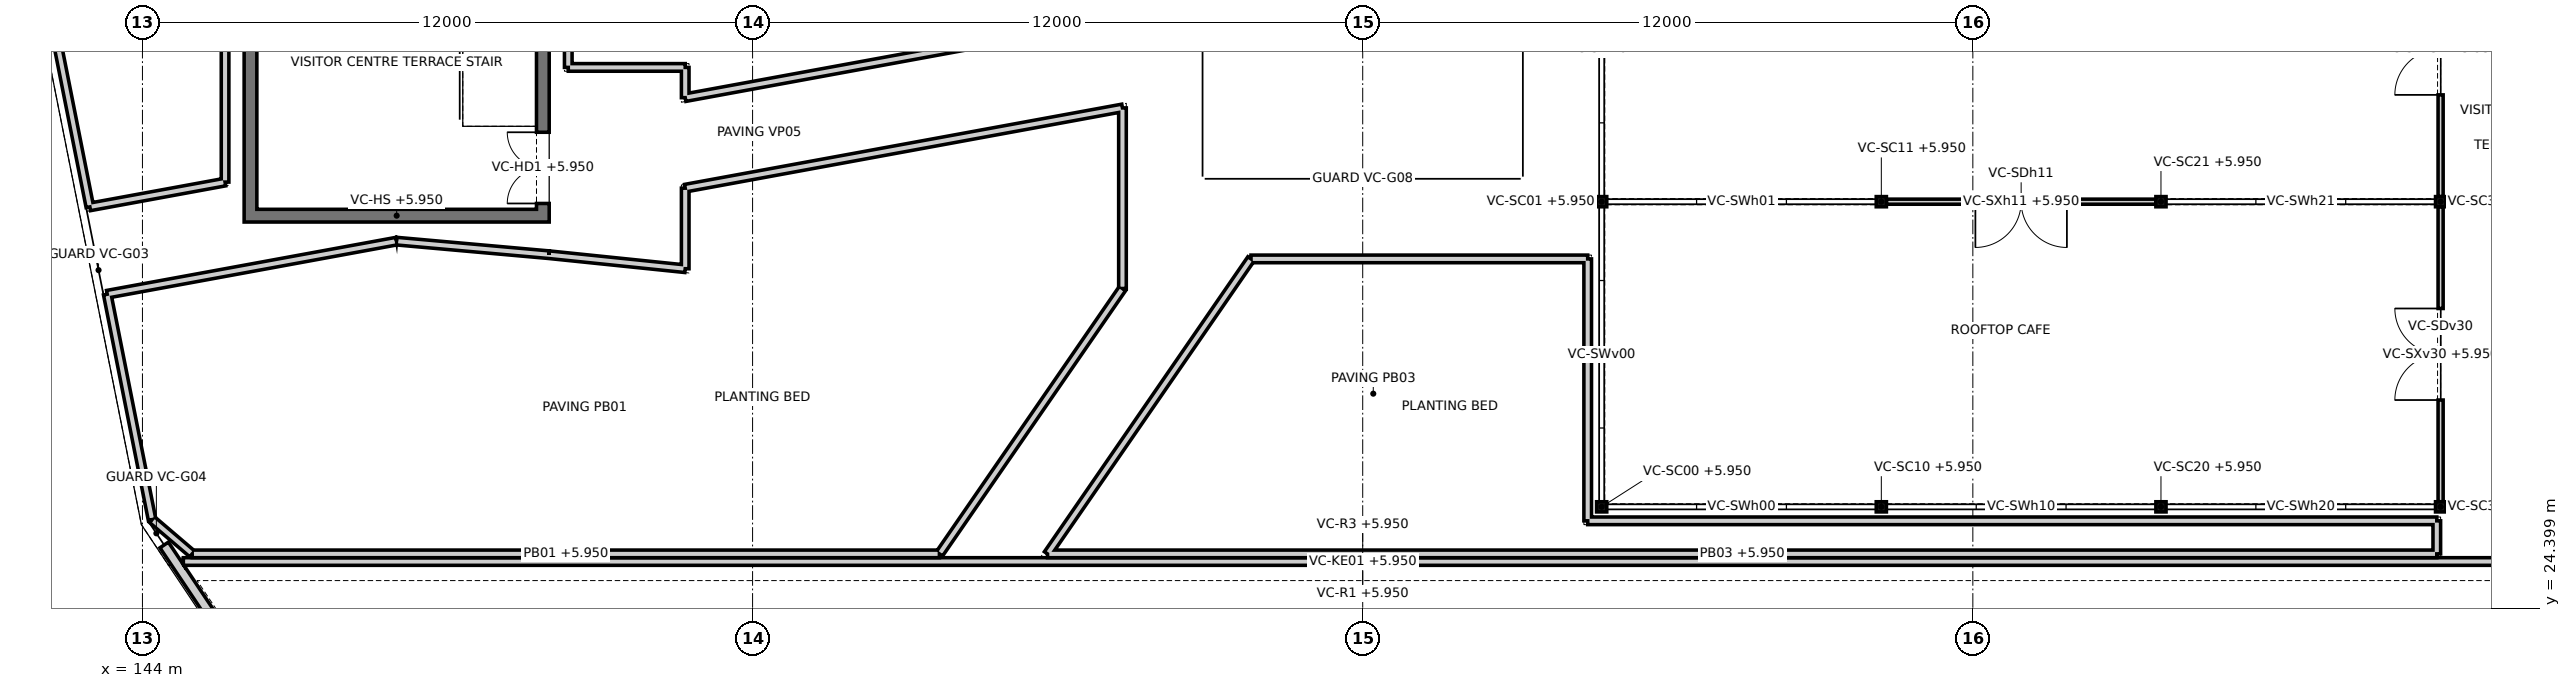
"""IFC4 building model, lengths in metres.
Left out: names, types, materials, properties, quantities, classifications, styles, units other than length and angle.
Written with IfcOpenShell. Run it as: python <this file> out.ifc"""

import sys

from ifc_helpers import new_model, si_unit, direction, frame, frame_2d, origin, origin_2d, place, context, subcontext, project, spatial, polyline, rectangle, hollow_rectangle, outline, extrude, element, fill, save


model = new_model("IFC4")
c1 = context("Model", 3, precision=1e-05, world=origin(), true_north=direction((0.0, 1.0)))
c2 = subcontext(c1, "Body", "Model", "MODEL_VIEW")
j1 = project(units=[si_unit("LENGTHUNIT", "METRE"), si_unit("PLANEANGLEUNIT", "RADIAN")], contexts=[c1])
p1 = place(None, origin())
s1 = spatial("IfcSite", under=j1, at=p1, CompositionType="ELEMENT")
p2 = place(p1, origin())
s2 = spatial("IfcBuilding", under=s1, at=p2, CompositionType="ELEMENT")
p3 = place(p2, frame((0.0, 0.0, 6.0)))
s3 = spatial("IfcBuildingStorey", under=s2, at=p3, CompositionType="ELEMENT", Elevation=6.0)
p4 = place(p3, frame((148.996, 31.625, -0.05), z_axis=(0.0, 0.0, 1.0), x_axis=(-0.983582964216, -0.180456511395, 0.0)))
e1 = element("IfcWall", 1, at=p4, inside=s3, PredefinedType="PARAPET", context=c2, shape_type="SweptSolid", body=[
    extrude(outline(polyline([(-0.01, -0.075), (5.86, -0.075), (5.708, 0.075), (0.01, 0.075), (-0.01, -0.075)])), origin(), (0.0, 0.0, 1.0), 0.5),
])
p5 = place(p3, frame((143.307, 30.581, -0.05), z_axis=(0.0, 0.0, 1.0), x_axis=(0.195097795379, -0.980783793829, 0.0)))
e2 = element("IfcWall", 2, at=p5, inside=s3, PredefinedType="PARAPET", context=c2, shape_type="SweptSolid", body=[
    extrude(outline(polyline([(-0.076, -0.075), (4.545, -0.075), (4.493, 0.075), (0.076, 0.075), (-0.076, -0.075)])), origin(), (0.0, 0.0, 1.0), 0.5),
])
p6 = place(p3, frame((144.189, 26.149, -0.05), z_axis=(0.0, 0.0, 1.0), x_axis=(0.760451137775, -0.649395154783, 0.0)))
e3 = element("IfcWall", 3, at=p6, inside=s3, PredefinedType="PARAPET", context=c2, shape_type="SweptSolid", body=[
    extrude(outline(polyline([(-0.026, -0.075), (1.065, -0.075), (1.01, 0.075), (0.026, 0.075), (-0.026, -0.075)])), origin(), (0.0, 0.0, 1.0), 0.5),
])
p7 = place(p3, frame((144.978, 25.475, -0.05), z_axis=(0.0, 0.0, 1.0), x_axis=(1.0, 0.0, 0.0)))
e4 = element("IfcWall", 4, at=p7, inside=s3, PredefinedType="PARAPET", context=c2, shape_type="SweptSolid", body=[
    extrude(outline(polyline([(-0.028, -0.075), (14.736, -0.075), (14.657, 0.075), (0.028, 0.075), (-0.028, -0.075)])), origin(), (0.0, 0.0, 1.0), 0.5),
])
p8 = place(p3, frame((159.675, 25.475, -0.05), z_axis=(0.0, 0.0, 1.0), x_axis=(0.567907537853, 0.823092357181, 0.0)))
e5 = element("IfcWall", 5, at=p8, inside=s3, PredefinedType="PARAPET", context=c2, shape_type="SweptSolid", body=[
    extrude(outline(polyline([(-0.039, -0.075), (6.363, -0.075), (6.316, 0.075), (0.039, 0.075), (-0.039, -0.075)])), origin(), (0.0, 0.0, 1.0), 0.5),
])
p9 = place(p3, frame((163.275, 30.693, -0.05), z_axis=(0.0, 0.0, 1.0), x_axis=(0.0, 1.0, 0.0)))
e6 = element("IfcWall", 6, at=p9, inside=s3, PredefinedType="PARAPET", context=c2, shape_type="SweptSolid", body=[
    extrude(outline(polyline([(-0.023, -0.075), (3.641, -0.075), (3.461, 0.075), (0.023, 0.075), (-0.023, -0.075)])), origin(), (0.0, 0.0, 1.0), 0.5),
])
p10 = place(p3, frame((163.275, 34.244, -0.05), z_axis=(0.0, 0.0, 1.0), x_axis=(-0.983586327493, -0.180438178801, 0.0)))
e7 = element("IfcWall", 7, at=p10, inside=s3, PredefinedType="PARAPET", context=c2, shape_type="SweptSolid", body=[
    extrude(outline(polyline([(-0.09, -0.075), (8.806, -0.075), (8.681, 0.075), (0.09, 0.075), (-0.09, -0.075)])), origin(), (0.0, 0.0, 1.0), 0.5),
])
p11 = place(p3, frame((154.675, 32.666, -0.05), z_axis=(0.0, 0.0, 1.0), x_axis=(0.0, -1.0, 0.0)))
e8 = element("IfcWall", 8, at=p11, inside=s3, PredefinedType="PARAPET", context=c2, shape_type="SweptSolid", body=[
    extrude(outline(polyline([(-0.062, -0.075), (1.501, -0.075), (1.667, 0.075), (0.062, 0.075), (-0.062, -0.075)])), origin(), (0.0, 0.0, 1.0), 0.5),
])
p12 = place(p3, frame((154.675, 31.082, -0.05), z_axis=(0.0, 0.0, 1.0), x_axis=(-0.994742485046, 0.102407951082, 0.0)))
e9 = element("IfcWall", 9, at=p12, inside=s3, PredefinedType="PARAPET", context=c2, shape_type="SweptSolid", body=[
    extrude(outline(polyline([(0.083, -0.075), (2.697, -0.075), (2.696, 0.075), (-0.083, 0.075), (0.083, -0.075)])), origin(), (0.0, 0.0, 1.0), 0.5),
])
p13 = place(p3, frame((151.993, 31.358, -0.05), z_axis=(0.0, 0.0, 1.0), x_axis=(-0.996066276854, 0.088611354324, 0.0)))
e10 = element("IfcWall", 10, at=p13, inside=s3, PredefinedType="PARAPET", context=c2, shape_type="SweptSolid", body=[
    extrude(outline(polyline([(-0.0, -0.075), (3.019, -0.075), (2.998, 0.075), (0.0, 0.075), (-0.0, -0.075)])), origin(), (0.0, 0.0, 1.0), 0.5),
])
p14 = place(p3, frame((142.229, 35.999, -0.05), z_axis=(0.0, 0.0, 1.0), x_axis=(0.195095964935, -0.98078415794, 0.0)))
e11 = element("IfcWall", 11, at=p14, inside=s3, PredefinedType="PARAPET", context=c2, shape_type="SweptSolid", body=[
    extrude(outline(polyline([(-0.016, -0.075), (3.848, -0.075), (3.7, 0.075), (0.016, 0.075), (-0.016, -0.075)])), origin(), (0.0, 0.0, 1.0), 0.5),
])
p15 = place(p3, frame((142.966, 32.297, -0.05), z_axis=(0.0, 0.0, 1.0), x_axis=(0.983588399423, 0.180426884139, 0.0)))
e12 = element("IfcWall", 12, at=p15, inside=s3, PredefinedType="PARAPET", context=c2, shape_type="SweptSolid", body=[
    extrude(outline(polyline([(-0.074, -0.075), (2.766, -0.075), (2.641, 0.075), (0.074, 0.075), (-0.074, -0.075)])), origin(), (0.0, 0.0, 1.0), 0.5),
])
p16 = place(p3, frame((145.625, 32.785, -0.05), z_axis=(0.0, 0.0, 1.0), x_axis=(0.0, 1.0, 0.0)))
e13 = element("IfcWall", 13, at=p16, inside=s3, PredefinedType="PARAPET", context=c2, shape_type="SweptSolid", body=[
    extrude(outline(polyline([(-0.062, -0.075), (7.515, -0.075), (7.665, 0.075), (0.062, 0.075), (-0.062, -0.075)])), origin(), (0.0, 0.0, 1.0), 0.5),
])
p17 = place(p3, frame((152.375, 40.375, -0.05), z_axis=(0.0, 0.0, 1.0), x_axis=(0.0, -1.0, 0.0)))
e14 = element("IfcWall", 14, at=p17, inside=s3, PredefinedType="PARAPET", context=c2, shape_type="SweptSolid", body=[
    extrude(outline(polyline([(0.075, -0.075), (5.41, -0.075), (5.26, 0.075), (-0.075, 0.075), (0.075, -0.075)])), origin(), (0.0, 0.0, 1.0), 0.5),
])
p18 = place(p3, frame((152.375, 35.04, -0.05), z_axis=(0.0, 0.0, 1.0), x_axis=(1.0, 0.0, 0.0)))
e15 = element("IfcWall", 15, at=p18, inside=s3, PredefinedType="PARAPET", context=c2, shape_type="SweptSolid", body=[
    extrude(outline(polyline([(-0.075, -0.075), (2.225, -0.075), (2.375, 0.075), (0.075, 0.075), (-0.075, -0.075)])), origin(), (0.0, 0.0, 1.0), 0.5),
])
p19 = place(p3, frame((154.675, 35.04, -0.05), z_axis=(0.0, 0.0, 1.0), x_axis=(0.0, -1.0, 0.0)))
e16 = element("IfcWall", 16, at=p19, inside=s3, PredefinedType="PARAPET", context=c2, shape_type="SweptSolid", body=[
    extrude(outline(polyline([(0.075, -0.075), (0.685, -0.075), (0.505, 0.075), (-0.075, 0.075), (0.075, -0.075)])), origin(), (0.0, 0.0, 1.0), 0.5),
])
p20 = place(p3, frame((154.675, 34.445, -0.05), z_axis=(0.0, 0.0, 1.0), x_axis=(0.983586327493, 0.180438178801, 0.0)))
e17 = element("IfcWall", 17, at=p20, inside=s3, PredefinedType="PARAPET", context=c2, shape_type="SweptSolid", body=[
    extrude(outline(polyline([(-0.09, -0.075), (8.806, -0.075), (8.681, 0.075), (0.09, 0.075), (-0.09, -0.075)])), origin(), (0.0, 0.0, 1.0), 0.5),
])
p21 = place(p3, frame((161.801, 25.475, -0.05), z_axis=(0.0, 0.0, 1.0), x_axis=(1.0, 0.0, 0.0)))
e18 = element("IfcWall", 18, at=p21, inside=s3, PredefinedType="PARAPET", context=c2, shape_type="SweptSolid", body=[
    extrude(outline(polyline([(-0.143, -0.075), (27.399, -0.075), (27.249, 0.075), (0.143, 0.075), (-0.143, -0.075)])), origin(), (0.0, 0.0, 1.0), 0.5),
])
p22 = place(p3, frame((189.125, 25.475, -0.05), z_axis=(0.0, 0.0, 1.0), x_axis=(0.0, 1.0, 0.0)))
e19 = element("IfcWall", 19, at=p22, inside=s3, PredefinedType="PARAPET", context=c2, shape_type="SweptSolid", body=[
    extrude(outline(polyline([(-0.075, -0.075), (0.725, -0.075), (0.575, 0.075), (0.075, 0.075), (-0.075, -0.075)])), origin(), (0.0, 0.0, 1.0), 0.5),
])
p23 = place(p3, frame((189.125, 26.125, -0.05), z_axis=(0.0, 0.0, 1.0), x_axis=(-1.0, 0.0, 0.0)))
e20 = element("IfcWall", 20, at=p23, inside=s3, PredefinedType="PARAPET", context=c2, shape_type="SweptSolid", body=[
    extrude(outline(polyline([(-0.075, -0.075), (16.625, -0.075), (16.775, 0.075), (0.075, 0.075), (-0.075, -0.075)])), origin(), (0.0, 0.0, 1.0), 0.5),
])
p24 = place(p3, frame((172.425, 26.125, -0.05), z_axis=(0.0, 0.0, 1.0), x_axis=(0.0, 1.0, 0.0)))
e21 = element("IfcWall", 21, at=p24, inside=s3, PredefinedType="PARAPET", context=c2, shape_type="SweptSolid", body=[
    extrude(outline(polyline([(0.075, -0.075), (5.225, -0.075), (5.075, 0.075), (-0.075, 0.075), (0.075, -0.075)])), origin(), (0.0, 0.0, 1.0), 0.5),
])
p25 = place(p3, frame((172.425, 31.275, -0.05), z_axis=(0.0, 0.0, 1.0), x_axis=(-1.0, 0.0, 0.0)))
e22 = element("IfcWall", 22, at=p25, inside=s3, PredefinedType="PARAPET", context=c2, shape_type="SweptSolid", body=[
    extrude(outline(polyline([(-0.075, -0.075), (6.661, -0.075), (6.583, 0.075), (0.075, 0.075), (-0.075, -0.075)])), origin(), (0.0, 0.0, 1.0), 0.5),
])
p26 = place(p3, frame((165.803, 31.275, -0.05), z_axis=(0.0, 0.0, 1.0), x_axis=(-0.567933729625, -0.823074285076, 0.0)))
e23 = element("IfcWall", 23, at=p26, inside=s3, PredefinedType="PARAPET", context=c2, shape_type="SweptSolid", body=[
    extrude(outline(polyline([(-0.039, -0.075), (7.189, -0.075), (6.904, 0.075), (0.039, 0.075), (-0.039, -0.075)])), origin(), (0.0, 0.0, 1.0), 0.5),
])
p27 = place(p3, frame((144.804, 25.325, -0.05), z_axis=(0.0, 0.0, 1.0), x_axis=(1.0, 0.0, 0.0)))
e24 = element("IfcWall", 24, at=p27, inside=s3, PredefinedType="PARAPET", context=c2, shape_type="SweptSolid", body=[
    extrude(rectangle(XDim=46.391, YDim=0.15, at=frame_2d((23.196, 0.0))), origin(), (0.0, 0.0, 1.0), 0.5),
])
p28 = place(p3, frame((144.427, 25.65, -0.05), z_axis=(0.0, 0.0, 1.0), x_axis=(0.555574555908, -0.831466723825, 0.0)))
e25 = element("IfcWall", 25, at=p28, inside=s3, PredefinedType="PARAPET", context=c2, shape_type="SweptSolid", body=[
    extrude(outline(polyline([(0.0, -0.1), (9.553, -0.1), (9.513, 0.1), (0.0, 0.1), (0.0, -0.1)])), origin(), (0.0, 0.0, 1.0), 1.1),
])
p29 = place(p3, frame((186.277, 17.723, -0.05), z_axis=(0.0, 0.0, 1.0), x_axis=(0.555574555908, 0.831466723825, 0.0)))
e26 = element("IfcWall", 26, at=p29, inside=s3, PredefinedType="PARAPET", context=c2, shape_type="SweptSolid", body=[
    extrude(outline(polyline([(-0.02, -0.1), (9.533, -0.1), (9.533, 0.1), (0.02, 0.1), (-0.02, -0.1)])), origin(), (0.0, 0.0, 1.0), 1.1),
])
p30 = place(p3, frame((151.875, 32.0, -0.05), z_axis=(0.0, 0.0, 1.0), x_axis=(0.0, 1.0, 0.0)))
e27 = element("IfcWall", 27, at=p30, inside=s3, PredefinedType="SOLIDWALL", context=c2, shape_type="SweptSolid", body=[
    extrude(rectangle(XDim=8.0, YDim=0.25, at=frame_2d((4.0, 0.0))), origin(), (0.0, 0.0, 1.0), 3.0),
])
p31 = place(p30, frame((0.365, 0.0, 0.0)))
e28 = element("IfcOpeningElement", 28, at=p31, cuts=e27, PredefinedType="OPENING", context=c2, shape_type="SweptSolid", body=[
    extrude(rectangle(XDim=1.4, YDim=2.2, at=frame_2d((0.7, 1.1))), frame((0.0, 0.135, 0.0), z_axis=(0.0, -1.0, 0.0), x_axis=(1.0, 0.0, 0.0)), (0.0, 0.0, 1.0), 0.27),
])
p32 = place(p3, frame((146.125, 32.0, -0.05), z_axis=(0.0, 0.0, 1.0), x_axis=(0.0, 1.0, 0.0)))
e29 = element("IfcWall", 29, at=p32, inside=s3, PredefinedType="SOLIDWALL", context=c2, shape_type="SweptSolid", body=[
    extrude(rectangle(XDim=8.0, YDim=0.25, at=frame_2d((4.0, 0.0))), origin(), (0.0, 0.0, 1.0), 3.0),
])
p33 = place(p3, frame((146.25, 32.125, -0.05), z_axis=(0.0, 0.0, 1.0), x_axis=(1.0, 0.0, 0.0)))
e30 = element("IfcWall", 30, at=p33, inside=s3, PredefinedType="SOLIDWALL", context=c2, shape_type="SweptSolid", body=[
    extrude(rectangle(XDim=5.5, YDim=0.25, at=frame_2d((2.75, 0.0))), origin(), (0.0, 0.0, 1.0), 3.0),
])
for number, where, z_axis, x_axis in (
    (31, (172.7, 26.4, -0.05), (0.0, 0.0, 1.0), (1.0, 0.0, 0.0)),
    (32, (172.7, 32.4, -0.05), (0.0, 0.0, 1.0), (1.0, 0.0, 0.0)),
    (33, (178.2, 26.4, -0.05), (0.0, 0.0, 1.0), (1.0, 0.0, 0.0)),
    (34, (178.2, 32.4, -0.05), (0.0, 0.0, 1.0), (1.0, 0.0, 0.0)),
    (35, (183.7, 26.4, -0.05), (0.0, 0.0, 1.0), (1.0, 0.0, 0.0)),
    (36, (183.7, 32.4, -0.05), (0.0, 0.0, 1.0), (1.0, 0.0, 0.0)),
    (37, (189.2, 26.4, -0.05), (0.0, 0.0, 1.0), (1.0, 0.0, 0.0)),
    (38, (189.2, 32.4, -0.05), (0.0, 0.0, 1.0), (1.0, 0.0, 0.0)),
):
    element("IfcColumn", number, at=place(p3, frame(where, z_axis=z_axis, x_axis=x_axis)), inside=s3, PredefinedType="COLUMN", context=c2, shape_type="SweptSolid", body=[
        extrude(hollow_rectangle(XDim=0.2, YDim=0.2, WallThickness=0.01, at=origin_2d()), origin(), (0.0, 0.0, 1.0), 4.21),
    ])
p34 = place(p3, frame((178.3, 32.4, -0.05), z_axis=(0.0, 0.0, 1.0), x_axis=(1.0, 0.0, 0.0)))
e39 = element("IfcWall", 39, at=p34, inside=s3, PredefinedType="PARTITIONING", context=c2, shape_type="SweptSolid", body=[
    extrude(rectangle(XDim=5.3, YDim=0.1, at=frame_2d((2.65, 0.0))), origin(), (0.0, 0.0, 1.0), 4.21),
])
p35 = place(p34, frame((1.75, 0.0, 0.05)))
e40 = element("IfcOpeningElement", 40, at=p35, cuts=e39, PredefinedType="OPENING", context=c2, shape_type="SweptSolid", body=[
    extrude(rectangle(XDim=1.8, YDim=2.4, at=frame_2d((0.9, 1.2))), frame((0.0, 0.06, 0.0), z_axis=(0.0, -1.0, 0.0), x_axis=(1.0, 0.0, 0.0)), (0.0, 0.0, 1.0), 0.12),
])
p36 = place(p3, frame((189.2, 26.5, -0.05), z_axis=(0.0, 0.0, 1.0), x_axis=(0.0, 1.0, 0.0)))
e41 = element("IfcWall", 41, at=p36, inside=s3, PredefinedType="PARTITIONING", context=c2, shape_type="SweptSolid", body=[
    extrude(rectangle(XDim=5.8, YDim=0.1, at=frame_2d((2.9, 0.0))), origin(), (0.0, 0.0, 1.0), 4.21),
])
p37 = place(p36, frame((2.0, 0.0, 0.05)))
e42 = element("IfcOpeningElement", 42, at=p37, cuts=e41, PredefinedType="OPENING", context=c2, shape_type="SweptSolid", body=[
    extrude(rectangle(XDim=1.8, YDim=2.4, at=frame_2d((0.9, 1.2))), frame((0.0, 0.06, 0.0), z_axis=(0.0, -1.0, 0.0), x_axis=(1.0, 0.0, 0.0)), (0.0, 0.0, 1.0), 0.12),
])
p38 = place(p3, frame((189.2, 32.5, -0.05), z_axis=(0.0, 0.0, 1.0), x_axis=(0.0, 1.0, 0.0)))
e43 = element("IfcWall", 43, at=p38, inside=s3, PredefinedType="PARTITIONING", context=c2, shape_type="SweptSolid", body=[
    extrude(rectangle(XDim=5.8, YDim=0.1, at=frame_2d((2.9, 0.0))), origin(), (0.0, 0.0, 1.0), 4.21),
])
p39 = place(p38, frame((2.0, 0.0, 0.05)))
e44 = element("IfcOpeningElement", 44, at=p39, cuts=e43, PredefinedType="OPENING", context=c2, shape_type="SweptSolid", body=[
    extrude(rectangle(XDim=1.8, YDim=2.4, at=frame_2d((0.9, 1.2))), frame((0.0, 0.06, 0.0), z_axis=(0.0, -1.0, 0.0), x_axis=(1.0, 0.0, 0.0)), (0.0, 0.0, 1.0), 0.12),
])
p40 = place(p3, frame((0.0, 0.0, -0.451)))
p41 = place(p40, frame((168.0, 36.0, 0.0)))
p42 = place(p41, frame((0.0, 0.0, 0.351)))
e45 = element("IfcWindow", 45, at=p42, inside=s3, PartitioningType="SINGLE_PANEL", PredefinedType="SKYLIGHT", context=c2, shape_type="SweptSolid", body=[
    extrude(rectangle(XDim=5.6, YDim=5.6, at=origin_2d()), origin(), (0.0, 0.0, 1.0), 0.05),
])
p43 = place(p31, origin())
e46 = element("IfcDoor", 46, at=p43, inside=s3, OperationType="DOUBLE_DOOR_SINGLE_SWING", PredefinedType="DOOR", context=c2, shape_type="SweptSolid", body=[
    extrude(rectangle(XDim=1.4, YDim=2.2, at=frame_2d((0.7, 1.1))), frame((0.0, 0.025, 0.0), z_axis=(0.0, -1.0, 0.0), x_axis=(1.0, 0.0, 0.0)), (0.0, 0.0, 1.0), 0.05),
])
fill(e28, e46)
p44 = place(p35, frame((1.8, 0.0, 0.0), z_axis=(0.0, 0.0, 1.0), x_axis=(-1.0, 0.0, 0.0)))
e47 = element("IfcDoor", 47, at=p44, inside=s3, OperationType="DOUBLE_DOOR_SINGLE_SWING", PredefinedType="DOOR", context=c2, shape_type="SweptSolid", body=[
    extrude(rectangle(XDim=1.8, YDim=2.4, at=frame_2d((0.9, 1.2))), frame((0.0, 0.025, 0.0), z_axis=(0.0, -1.0, 0.0), x_axis=(1.0, 0.0, 0.0)), (0.0, 0.0, 1.0), 0.05),
])
fill(e40, e47)
p45 = place(p37, origin())
e48 = element("IfcDoor", 48, at=p45, inside=s3, OperationType="DOUBLE_DOOR_SINGLE_SWING", PredefinedType="DOOR", context=c2, shape_type="SweptSolid", body=[
    extrude(rectangle(XDim=1.8, YDim=2.4, at=frame_2d((0.9, 1.2))), frame((0.0, 0.025, 0.0), z_axis=(0.0, -1.0, 0.0), x_axis=(1.0, 0.0, 0.0)), (0.0, 0.0, 1.0), 0.05),
])
fill(e42, e48)
p46 = place(p39, origin())
e49 = element("IfcDoor", 49, at=p46, inside=s3, OperationType="DOUBLE_DOOR_SINGLE_SWING", PredefinedType="DOOR", context=c2, shape_type="SweptSolid", body=[
    extrude(rectangle(XDim=1.8, YDim=2.4, at=frame_2d((0.9, 1.2))), frame((0.0, 0.025, 0.0), z_axis=(0.0, -1.0, 0.0), x_axis=(1.0, 0.0, 0.0)), (0.0, 0.0, 1.0), 0.05),
])
fill(e44, e49)
save(model, sys.argv[1])
